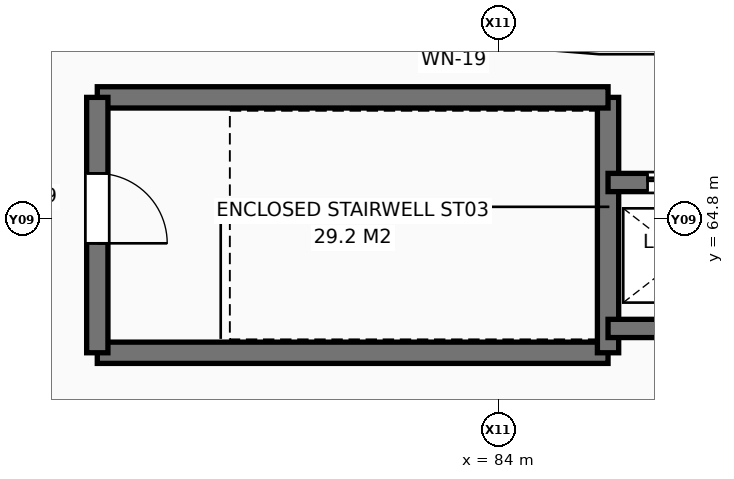
"""IFC4 building model, lengths in metres.
Left out: names, types, materials, properties, quantities, classifications, styles, units other than length and angle.
Written with IfcOpenShell. Run it as: python <this file> out.ifc"""

import sys

from ifc_helpers import new_model, si_unit, direction, frame, frame_2d, origin, place, context, subcontext, project, spatial, rectangle, extrude, element, fill, save


model = new_model("IFC4")
c1 = context("Model", 3, precision=1e-05, world=origin(), true_north=direction((0.0, 1.0)))
c2 = subcontext(c1, "Body", "Model", "MODEL_VIEW")
j1 = project(units=[si_unit("LENGTHUNIT", "METRE"), si_unit("PLANEANGLEUNIT", "RADIAN")], contexts=[c1])
p1 = place(None, origin())
s1 = spatial("IfcSite", under=j1, at=p1, CompositionType="ELEMENT")
p2 = place(p1, origin())
s2 = spatial("IfcBuilding", under=s1, at=p2, CompositionType="ELEMENT")
p3 = place(p2, frame((0.0, 0.0, 26.4)))
s3 = spatial("IfcBuildingStorey", under=s2, at=p3, CompositionType="ELEMENT", Elevation=26.4)
p4 = place(p3, frame((79.171, 68.104, 0.0), z_axis=(0.0, 0.0, 1.0), x_axis=(0.999197261913, -0.040060351782, 0.0)))
e1 = element("IfcWall", 1, at=p4, inside=s3, PredefinedType="SOLIDWALL", context=c2, shape_type="SweptSolid", body=[
    extrude(rectangle(XDim=13.097, YDim=0.34, at=frame_2d((6.548, 0.0))), origin(), (0.0, 0.0, 1.0), 3.463),
])
p5 = place(p4, frame((3.365, 0.0, 0.9)))
e2 = element("IfcOpeningElement", 2, at=p5, cuts=e1, PredefinedType="OPENING", context=c2, shape_type="SweptSolid", body=[
    extrude(rectangle(XDim=1.5, YDim=1.8, at=frame_2d((0.75, 0.9))), frame((0.0, 0.18, 0.0), z_axis=(0.0, -1.0, 0.0), x_axis=(1.0, 0.0, 0.0)), (0.0, 0.0, 1.0), 0.36),
])
p6 = place(p4, frame((8.231, 0.0, 0.9)))
e3 = element("IfcOpeningElement", 3, at=p6, cuts=e1, PredefinedType="OPENING", context=c2, shape_type="SweptSolid", body=[
    extrude(rectangle(XDim=1.5, YDim=1.8, at=frame_2d((0.75, 0.9))), frame((0.0, 0.18, 0.0), z_axis=(0.0, -1.0, 0.0), x_axis=(1.0, 0.0, 0.0)), (0.0, 0.0, 1.0), 0.36),
])
p7 = place(p3, frame((77.4, 62.6, 0.0), z_axis=(0.0, 0.0, 1.0), x_axis=(1.0, 0.0, 0.0)))
e4 = element("IfcWall", 4, at=p7, inside=s3, PredefinedType="SHEAR", context=c2, shape_type="SweptSolid", body=[
    extrude(rectangle(XDim=8.4, YDim=0.35, at=frame_2d((4.2, 0.0))), origin(), (0.0, 0.0, 1.0), 3.92),
])
p8 = place(p3, frame((85.8, 62.6, 0.0), z_axis=(0.0, 0.0, 1.0), x_axis=(0.0, 1.0, 0.0)))
e5 = element("IfcWall", 5, at=p8, inside=s3, PredefinedType="SHEAR", context=c2, shape_type="SweptSolid", body=[
    extrude(rectangle(XDim=4.2, YDim=0.35, at=frame_2d((2.1, 0.0))), origin(), (0.0, 0.0, 1.0), 3.92),
])
p9 = place(p3, frame((85.8, 66.8, 0.0), z_axis=(0.0, 0.0, 1.0), x_axis=(-1.0, 0.0, 0.0)))
e6 = element("IfcWall", 6, at=p9, inside=s3, PredefinedType="SHEAR", context=c2, shape_type="SweptSolid", body=[
    extrude(rectangle(XDim=8.4, YDim=0.35, at=frame_2d((4.2, 0.0))), origin(), (0.0, 0.0, 1.0), 3.92),
])
p10 = place(p3, frame((77.4, 66.8, 0.0), z_axis=(0.0, 0.0, 1.0), x_axis=(0.0, -1.0, 0.0)))
e7 = element("IfcWall", 7, at=p10, inside=s3, PredefinedType="SHEAR", context=c2, shape_type="SweptSolid", body=[
    extrude(rectangle(XDim=4.2, YDim=0.35, at=frame_2d((2.1, 0.0))), origin(), (0.0, 0.0, 1.0), 3.92),
])
p11 = place(p10, frame((1.25, 0.0, 0.0)))
e8 = element("IfcOpeningElement", 8, at=p11, cuts=e7, PredefinedType="OPENING", context=c2, shape_type="SweptSolid", body=[
    extrude(rectangle(XDim=1.15, YDim=2.2, at=frame_2d((0.575, 1.1))), frame((0.0, 0.185, 0.0), z_axis=(0.0, -1.0, 0.0), x_axis=(1.0, 0.0, 0.0)), (0.0, 0.0, 1.0), 0.37),
])
p12 = place(p3, frame((88.3, 65.4, 0.0), z_axis=(0.0, 0.0, 1.0), x_axis=(-1.0, 0.0, 0.0)))
e9 = element("IfcWall", 9, at=p12, inside=s3, PredefinedType="SHEAR", context=c2, shape_type="SweptSolid", body=[
    extrude(rectangle(XDim=2.5, YDim=0.3, at=frame_2d((1.25, 0.0))), origin(), (0.0, 0.0, 1.0), 3.92),
])
p13 = place(p12, frame((0.65, 0.0, 0.0)))
e10 = element("IfcOpeningElement", 10, at=p13, cuts=e9, PredefinedType="OPENING", context=c2, shape_type="SweptSolid", body=[
    extrude(rectangle(XDim=1.2, YDim=2.25, at=frame_2d((0.6, 1.125))), frame((0.0, 0.16, 0.0), z_axis=(0.0, -1.0, 0.0), x_axis=(1.0, 0.0, 0.0)), (0.0, 0.0, 1.0), 0.32),
])
p14 = place(p3, frame((85.8, 63.0, 0.0), z_axis=(0.0, 0.0, 1.0), x_axis=(1.0, 0.0, 0.0)))
e11 = element("IfcWall", 11, at=p14, inside=s3, PredefinedType="SHEAR", context=c2, shape_type="SweptSolid", body=[
    extrude(rectangle(XDim=2.5, YDim=0.3, at=frame_2d((1.25, 0.0))), origin(), (0.0, 0.0, 1.0), 3.92),
])
p15 = place(p11, origin())
e12 = element("IfcDoor", 12, at=p15, inside=s3, OperationType="SINGLE_SWING_RIGHT", PredefinedType="DOOR", context=c2, shape_type="SweptSolid", body=[
    extrude(rectangle(XDim=1.15, YDim=2.2, at=frame_2d((0.575, 1.1))), frame((0.0, 0.025, 0.0), z_axis=(0.0, -1.0, 0.0), x_axis=(1.0, 0.0, 0.0)), (0.0, 0.0, 1.0), 0.05),
])
fill(e8, e12)
p16 = place(p13, origin())
e13 = element("IfcDoor", 13, at=p16, inside=s3, OperationType="SLIDING_TO_LEFT", PredefinedType="DOOR", context=c2, shape_type="SweptSolid", body=[
    extrude(rectangle(XDim=1.2, YDim=2.25, at=frame_2d((0.6, 1.125))), frame((0.0, 0.025, 0.0), z_axis=(0.0, -1.0, 0.0), x_axis=(1.0, 0.0, 0.0)), (0.0, 0.0, 1.0), 0.05),
])
fill(e10, e13)
save(model, sys.argv[1])
